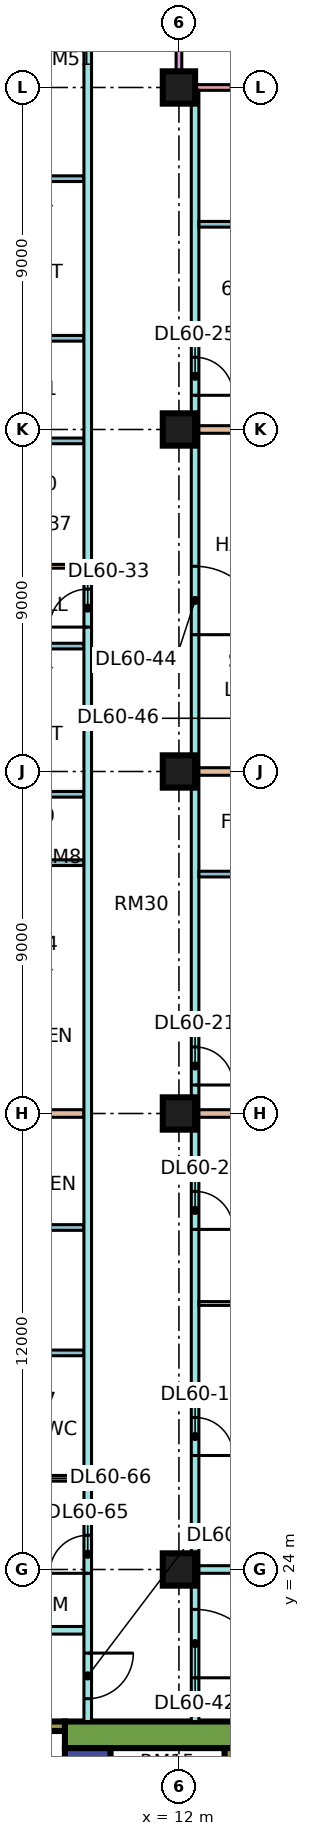
"""IFC4 building model, lengths in metres.
Left out: names, types, materials, properties, quantities, classifications, styles, units other than length and angle.
Written with IfcOpenShell. Run it as: python <this file> out.ifc"""

import sys

from ifc_helpers import new_model, si_unit, direction, frame, frame_2d, origin, origin_2d, place, context, subcontext, project, spatial, rectangle, extrude, element, fill, save


model = new_model("IFC4")
c1 = context("Model", 3, precision=1e-05, world=origin(), true_north=direction((0.0, 1.0)))
c2 = subcontext(c1, "Body", "Model", "MODEL_VIEW")
j1 = project(units=[si_unit("LENGTHUNIT", "METRE"), si_unit("PLANEANGLEUNIT", "RADIAN")], contexts=[c1])
p1 = place(None, origin())
s1 = spatial("IfcSite", under=j1, at=p1, CompositionType="ELEMENT")
p2 = place(p1, origin())
s2 = spatial("IfcBuilding", under=s1, at=p2, CompositionType="ELEMENT")
p3 = place(p2, frame((0.0, 0.0, 252.9)))
s3 = spatial("IfcBuildingStorey", under=s2, at=p3, CompositionType="ELEMENT", Elevation=252.9)
for number, where, z_axis, x_axis in (
    (1, (12.0, 24.0, 0.0), (0.0, 0.0, 1.0), (1.0, 0.0, 0.0)),
    (2, (12.0, 36.0, 0.0), (0.0, 0.0, 1.0), (1.0, 0.0, 0.0)),
    (3, (12.0, 45.0, 0.0), (0.0, 0.0, 1.0), (1.0, 0.0, 0.0)),
    (4, (12.0, 54.0, 0.0), (0.0, 0.0, 1.0), (1.0, 0.0, 0.0)),
    (5, (12.0, 63.0, 0.0), (0.0, 0.0, 1.0), (1.0, 0.0, 0.0)),
):
    element("IfcColumn", number, at=place(p3, frame(where, z_axis=z_axis, x_axis=x_axis)), inside=s3, PredefinedType="COLUMN", context=c2, shape_type="SweptSolid", body=[
        extrude(rectangle(XDim=0.85, YDim=0.85, at=origin_2d()), origin(), (0.0, 0.0, 1.0), 3.75),
    ])
p4 = place(p3, frame((9.0, 19.65, 0.0), z_axis=(0.0, 0.0, 1.0), x_axis=(1.0, 0.0, 0.0)))
e6 = element("IfcWall", 6, at=p4, inside=s3, PredefinedType="SHEAR", context=c2, shape_type="SweptSolid", body=[
    extrude(rectangle(XDim=25.0, YDim=0.7, at=frame_2d((12.5, 0.0))), origin(), (0.0, 0.0, 1.0), 3.75),
])
p5 = place(p4, frame((19.1, 0.0, 0.0)))
e7 = element("IfcOpeningElement", 7, at=p5, cuts=e6, PredefinedType="OPENING", context=c2, shape_type="SweptSolid", body=[
    extrude(rectangle(XDim=1.8, YDim=2.4, at=frame_2d((0.9, 1.2))), frame((0.0, 0.36, 0.0), z_axis=(0.0, -1.0, 0.0), x_axis=(1.0, 0.0, 0.0)), (0.0, 0.0, 1.0), 0.72),
])
p6 = place(p3, frame((9.6, 7.7, 0.0), z_axis=(0.0, 0.0, 1.0), x_axis=(0.0, 1.0, 0.0)))
e8 = element("IfcWall", 8, at=p6, inside=s3, PredefinedType="SHEAR", context=c2, shape_type="SweptSolid", body=[
    extrude(rectangle(XDim=11.6, YDim=1.2, at=frame_2d((5.8, 0.0))), origin(), (0.0, 0.0, 1.0), 3.75),
])
p7 = place(p6, frame((4.175, 0.0, 0.0)))
e9 = element("IfcOpeningElement", 9, at=p7, cuts=e8, PredefinedType="OPENING", context=c2, shape_type="SweptSolid", body=[
    extrude(rectangle(XDim=1.1, YDim=2.2, at=frame_2d((0.55, 1.1))), frame((0.0, 0.61, 0.0), z_axis=(0.0, -1.0, 0.0), x_axis=(1.0, 0.0, 0.0)), (0.0, 0.0, 1.0), 1.22),
])
p8 = place(p6, frame((6.675, 0.0, 0.0)))
e10 = element("IfcOpeningElement", 10, at=p8, cuts=e8, PredefinedType="OPENING", context=c2, shape_type="SweptSolid", body=[
    extrude(rectangle(XDim=1.1, YDim=2.2, at=frame_2d((0.55, 1.1))), frame((0.0, 0.61, 0.0), z_axis=(0.0, -1.0, 0.0), x_axis=(1.0, 0.0, 0.0)), (0.0, 0.0, 1.0), 1.22),
])
p9 = place(p6, frame((9.55, 0.0, 0.0)))
e11 = element("IfcOpeningElement", 11, at=p9, cuts=e8, PredefinedType="OPENING", context=c2, shape_type="SweptSolid", body=[
    extrude(rectangle(XDim=1.1, YDim=2.2, at=frame_2d((0.55, 1.1))), frame((0.0, 0.61, 0.0), z_axis=(0.0, -1.0, 0.0), x_axis=(1.0, 0.0, 0.0)), (0.0, 0.0, 1.0), 1.22),
])
p10 = place(p6, frame((1.85, 0.0, 0.0)))
e12 = element("IfcOpeningElement", 12, at=p10, cuts=e8, PredefinedType="OPENING", context=c2, shape_type="SweptSolid", body=[
    extrude(rectangle(XDim=0.9, YDim=2.1, at=frame_2d((0.45, 1.05))), frame((0.0, 0.61, 0.0), z_axis=(0.0, -1.0, 0.0), x_axis=(1.0, 0.0, 0.0)), (0.0, 0.0, 1.0), 1.22),
])
p11 = place(p3, frame((13.325, 7.7, 0.0), z_axis=(0.0, 0.0, 1.0), x_axis=(0.0, 1.0, 0.0)))
e13 = element("IfcWall", 13, at=p11, inside=s3, PredefinedType="SHEAR", context=c2, shape_type="SweptSolid", body=[
    extrude(rectangle(XDim=11.6, YDim=0.25, at=frame_2d((5.8, 0.0))), origin(), (0.0, 0.0, 1.0), 3.75),
])
p12 = place(p3, frame((2.1, 19.875, 0.0), z_axis=(0.0, 0.0, 1.0), x_axis=(1.0, 0.0, 0.0)))
e14 = element("IfcWall", 14, at=p12, inside=s3, PredefinedType="SHEAR", context=c2, shape_type="SweptSolid", body=[
    extrude(rectangle(XDim=6.9, YDim=0.25, at=frame_2d((3.45, 0.0))), origin(), (0.0, 0.0, 1.0), 3.75),
])
p13 = place(p12, frame((1.175, 0.0, 0.0)))
e15 = element("IfcOpeningElement", 15, at=p13, cuts=e14, PredefinedType="OPENING", context=c2, shape_type="SweptSolid", body=[
    extrude(rectangle(XDim=1.1, YDim=2.2, at=frame_2d((0.55, 1.1))), frame((0.0, 0.135, 0.0), z_axis=(0.0, -1.0, 0.0), x_axis=(1.0, 0.0, 0.0)), (0.0, 0.0, 1.0), 0.27),
])
p14 = place(p12, frame((4.6, 0.0, 0.0)))
e16 = element("IfcOpeningElement", 16, at=p14, cuts=e14, PredefinedType="OPENING", context=c2, shape_type="SweptSolid", body=[
    extrude(rectangle(XDim=1.2, YDim=2.2, at=frame_2d((0.6, 1.1))), frame((0.0, 0.135, 0.0), z_axis=(0.0, -1.0, 0.0), x_axis=(1.0, 0.0, 0.0)), (0.0, 0.0, 1.0), 0.27),
])
p15 = place(p3, frame((22.425, 63.0, 0.0), z_axis=(0.0, 0.0, 1.0), x_axis=(-1.0, 0.0, 0.0)))
e17 = element("IfcWall", 17, at=p15, inside=s3, PredefinedType="SOLIDWALL", context=c2, shape_type="SweptSolid", body=[
    extrude(rectangle(XDim=10.35, YDim=0.15, at=frame_2d((5.175, 0.0))), origin(), (0.0, 0.0, 1.0), 3.3),
])
p16 = place(p15, frame((1.7, 0.0, 0.0)))
e18 = element("IfcOpeningElement", 18, at=p16, cuts=e17, PredefinedType="OPENING", context=c2, shape_type="SweptSolid", body=[
    extrude(rectangle(XDim=1.8, YDim=2.4, at=frame_2d((0.9, 1.2))), frame((0.0, 0.085, 0.0), z_axis=(0.0, -1.0, 0.0), x_axis=(1.0, 0.0, 0.0)), (0.0, 0.0, 1.0), 0.17),
])
p17 = place(p15, frame((6.05, 0.0, 0.45)))
e19 = element("IfcOpeningElement", 19, at=p17, cuts=e17, PredefinedType="OPENING", context=c2, shape_type="SweptSolid", body=[
    extrude(rectangle(XDim=3.0, YDim=2.4, at=frame_2d((1.5, 1.2))), frame((0.0, 0.085, 0.0), z_axis=(0.0, -1.0, 0.0), x_axis=(1.0, 0.0, 0.0)), (0.0, 0.0, 1.0), 0.17),
])
p18 = place(p3, frame((12.0, 64.5, 0.0), z_axis=(0.0, 0.0, 1.0), x_axis=(0.0, -1.0, 0.0)))
e20 = element("IfcWall", 20, at=p18, inside=s3, PredefinedType="SOLIDWALL", context=c2, shape_type="SweptSolid", body=[
    extrude(rectangle(XDim=1.5, YDim=0.15, at=frame_2d((0.75, 0.0))), origin(), (0.0, 0.0, 1.0), 3.3),
])
p19 = place(p3, frame((0.074, 22.4, 0.0), z_axis=(0.0, 0.0, 1.0), x_axis=(1.0, 0.0, 0.0)))
e21 = element("IfcWall", 21, at=p19, inside=s3, PredefinedType="PARTITIONING", context=c2, shape_type="SweptSolid", body=[
    extrude(rectangle(XDim=9.426, YDim=0.2, at=frame_2d((4.713, 0.0))), origin(), (0.0, 0.0, 1.0), 3.3),
])
p20 = place(p3, frame((6.375, 26.4, 0.0), z_axis=(0.0, 0.0, 1.0), x_axis=(1.0, 0.0, 0.0)))
e22 = element("IfcWall", 22, at=p20, inside=s3, PredefinedType="PARTITIONING", context=c2, shape_type="SweptSolid", body=[
    extrude(rectangle(XDim=3.125, YDim=0.15, at=frame_2d((1.562, 0.0))), origin(), (0.0, 0.0, 1.0), 3.3),
])
p21 = place(p20, frame((1.225, 0.0, 0.0)))
e23 = element("IfcOpeningElement", 23, at=p21, cuts=e22, PredefinedType="OPENING", context=c2, shape_type="SweptSolid", body=[
    extrude(rectangle(XDim=0.8, YDim=2.1, at=frame_2d((0.4, 1.05))), frame((0.0, 0.085, 0.0), z_axis=(0.0, -1.0, 0.0), x_axis=(1.0, 0.0, 0.0)), (0.0, 0.0, 1.0), 0.17),
])
for number, where, z_axis, x_axis in (
    (24, (6.375, 29.7, 0.0), (0.0, 0.0, 1.0), (1.0, 0.0, 0.0)),
    (25, (6.375, 33.0, 0.0), (0.0, 0.0, 1.0), (1.0, 0.0, 0.0)),
):
    element("IfcWall", number, at=place(p3, frame(where, z_axis=z_axis, x_axis=x_axis)), inside=s3, PredefinedType="PARTITIONING", context=c2, shape_type="SweptSolid", body=[
        extrude(rectangle(XDim=3.125, YDim=0.15, at=frame_2d((1.562, 0.0))), origin(), (0.0, 0.0, 1.0), 3.3),
    ])
p22 = place(p3, frame((6.525, 36.0, 0.0), z_axis=(0.0, 0.0, 1.0), x_axis=(1.0, 0.0, 0.0)))
e26 = element("IfcWall", 26, at=p22, inside=s3, PredefinedType="PARTITIONING", context=c2, shape_type="SweptSolid", body=[
    extrude(rectangle(XDim=2.975, YDim=0.2, at=frame_2d((1.488, 0.0))), origin(), (0.0, 0.0, 1.0), 3.3),
])
for number, where, z_axis, x_axis in (
    (27, (6.675, 42.6, 0.0), (0.0, 0.0, 1.0), (1.0, 0.0, 0.0)),
    (28, (6.675, 44.4, 0.0), (0.0, 0.0, 1.0), (1.0, 0.0, 0.0)),
    (29, (6.675, 48.3, 0.0), (0.0, 0.0, 1.0), (1.0, 0.0, 0.0)),
):
    element("IfcWall", number, at=place(p3, frame(where, z_axis=z_axis, x_axis=x_axis)), inside=s3, PredefinedType="PARTITIONING", context=c2, shape_type="SweptSolid", body=[
        extrude(rectangle(XDim=2.825, YDim=0.15, at=frame_2d((1.413, 0.0))), origin(), (0.0, 0.0, 1.0), 3.3),
    ])
p23 = place(p3, frame((6.675, 50.4, 0.0), z_axis=(0.0, 0.0, 1.0), x_axis=(1.0, 0.0, 0.0)))
e30 = element("IfcWall", 30, at=p23, inside=s3, PredefinedType="PARTITIONING", context=c2, shape_type="SweptSolid", body=[
    extrude(rectangle(XDim=2.825, YDim=0.1, at=frame_2d((1.413, 0.0))), origin(), (0.0, 0.0, 1.0), 3.3),
])
p24 = place(p23, frame((0.975, 0.0, 0.0)))
e31 = element("IfcOpeningElement", 31, at=p24, cuts=e30, PredefinedType="OPENING", context=c2, shape_type="SweptSolid", body=[
    extrude(rectangle(XDim=0.9, YDim=2.1, at=frame_2d((0.45, 1.05))), frame((0.0, 0.06, 0.0), z_axis=(0.0, -1.0, 0.0), x_axis=(1.0, 0.0, 0.0)), (0.0, 0.0, 1.0), 0.12),
])
for number, where, z_axis, x_axis in (
    (32, (6.675, 53.7, 0.0), (0.0, 0.0, 1.0), (1.0, 0.0, 0.0)),
    (33, (6.675, 56.4, 0.0), (0.0, 0.0, 1.0), (1.0, 0.0, 0.0)),
    (34, (6.675, 60.6, 0.0), (0.0, 0.0, 1.0), (1.0, 0.0, 0.0)),
):
    element("IfcWall", number, at=place(p3, frame(where, z_axis=z_axis, x_axis=x_axis)), inside=s3, PredefinedType="PARTITIONING", context=c2, shape_type="SweptSolid", body=[
        extrude(rectangle(XDim=2.825, YDim=0.15, at=frame_2d((1.413, 0.0))), origin(), (0.0, 0.0, 1.0), 3.3),
    ])
p25 = place(p3, frame((9.6, 20.0, 0.0), z_axis=(0.0, 0.0, 1.0), x_axis=(0.0, 1.0, 0.0)))
e35 = element("IfcWall", 35, at=p25, inside=s3, PredefinedType="PARTITIONING", context=c2, shape_type="SweptSolid", body=[
    extrude(rectangle(XDim=44.35, YDim=0.2, at=frame_2d((22.175, 0.0))), origin(), (0.0, 0.0, 1.0), 3.3),
])
p26 = place(p25, frame((28.8, 0.0, 0.0)))
e36 = element("IfcOpeningElement", 36, at=p26, cuts=e35, PredefinedType="OPENING", context=c2, shape_type="SweptSolid", body=[
    extrude(rectangle(XDim=1.0, YDim=2.1, at=frame_2d((0.5, 1.05))), frame((0.0, 0.11, 0.0), z_axis=(0.0, -1.0, 0.0), x_axis=(1.0, 0.0, 0.0)), (0.0, 0.0, 1.0), 0.22),
])
p27 = place(p25, frame((0.6, 0.0, 0.0)))
e37 = element("IfcOpeningElement", 37, at=p27, cuts=e35, PredefinedType="OPENING", context=c2, shape_type="SweptSolid", body=[
    extrude(rectangle(XDim=1.2, YDim=2.1, at=frame_2d((0.6, 1.05))), frame((0.0, 0.11, 0.0), z_axis=(0.0, -1.0, 0.0), x_axis=(1.0, 0.0, 0.0)), (0.0, 0.0, 1.0), 0.22),
])
p28 = place(p25, frame((3.9, 0.0, 0.0)))
e38 = element("IfcOpeningElement", 38, at=p28, cuts=e35, PredefinedType="OPENING", context=c2, shape_type="SweptSolid", body=[
    extrude(rectangle(XDim=1.0, YDim=2.1, at=frame_2d((0.5, 1.05))), frame((0.0, 0.11, 0.0), z_axis=(0.0, -1.0, 0.0), x_axis=(1.0, 0.0, 0.0)), (0.0, 0.0, 1.0), 0.22),
])
p29 = place(p3, frame((12.425, 20.0, 0.0), z_axis=(0.0, 0.0, 1.0), x_axis=(0.0, 1.0, 0.0)))
e39 = element("IfcWall", 39, at=p29, inside=s3, PredefinedType="PARTITIONING", context=c2, shape_type="SweptSolid", body=[
    extrude(rectangle(XDim=42.926, YDim=0.2, at=frame_2d((21.463, 0.0))), origin(), (0.0, 0.0, 1.0), 3.3),
])
p30 = place(p29, frame((7.0, 0.0, 0.0)))
e40 = element("IfcOpeningElement", 40, at=p30, cuts=e39, PredefinedType="OPENING", context=c2, shape_type="SweptSolid", body=[
    extrude(rectangle(XDim=1.0, YDim=2.1, at=frame_2d((0.5, 1.05))), frame((0.0, 0.11, 0.0), z_axis=(0.0, -1.0, 0.0), x_axis=(1.0, 0.0, 0.0)), (0.0, 0.0, 1.0), 0.22),
])
p31 = place(p29, frame((12.95, 0.0, 0.0)))
e41 = element("IfcOpeningElement", 41, at=p31, cuts=e39, PredefinedType="OPENING", context=c2, shape_type="SweptSolid", body=[
    extrude(rectangle(XDim=1.0, YDim=2.1, at=frame_2d((0.5, 1.05))), frame((0.0, 0.11, 0.0), z_axis=(0.0, -1.0, 0.0), x_axis=(1.0, 0.0, 0.0)), (0.0, 0.0, 1.0), 0.22),
])
p32 = place(p29, frame((16.75, 0.0, 0.0)))
e42 = element("IfcOpeningElement", 42, at=p32, cuts=e39, PredefinedType="OPENING", context=c2, shape_type="SweptSolid", body=[
    extrude(rectangle(XDim=1.0, YDim=2.1, at=frame_2d((0.5, 1.05))), frame((0.0, 0.11, 0.0), z_axis=(0.0, -1.0, 0.0), x_axis=(1.0, 0.0, 0.0)), (0.0, 0.0, 1.0), 0.22),
])
p33 = place(p29, frame((34.9, 0.0, 0.0)))
e43 = element("IfcOpeningElement", 43, at=p33, cuts=e39, PredefinedType="OPENING", context=c2, shape_type="SweptSolid", body=[
    extrude(rectangle(XDim=1.0, YDim=2.1, at=frame_2d((0.5, 1.05))), frame((0.0, 0.11, 0.0), z_axis=(0.0, -1.0, 0.0), x_axis=(1.0, 0.0, 0.0)), (0.0, 0.0, 1.0), 0.22),
])
p34 = place(p29, frame((1.15, 0.0, 0.0)))
e44 = element("IfcOpeningElement", 44, at=p34, cuts=e39, PredefinedType="OPENING", context=c2, shape_type="SweptSolid", body=[
    extrude(rectangle(XDim=1.8, YDim=2.1, at=frame_2d((0.9, 1.05))), frame((0.0, 0.11, 0.0), z_axis=(0.0, -1.0, 0.0), x_axis=(1.0, 0.0, 0.0)), (0.0, 0.0, 1.0), 0.22),
])
p35 = place(p29, frame((28.6, 0.0, 0.0)))
e45 = element("IfcOpeningElement", 45, at=p35, cuts=e39, PredefinedType="OPENING", context=c2, shape_type="SweptSolid", body=[
    extrude(rectangle(XDim=1.8, YDim=2.1, at=frame_2d((0.9, 1.05))), frame((0.0, 0.11, 0.0), z_axis=(0.0, -1.0, 0.0), x_axis=(1.0, 0.0, 0.0)), (0.0, 0.0, 1.0), 0.22),
])
p36 = place(p3, frame((12.525, 24.0, 0.0), z_axis=(0.0, 0.0, 1.0), x_axis=(1.0, 0.0, 0.0)))
e46 = element("IfcWall", 46, at=p36, inside=s3, PredefinedType="PARTITIONING", context=c2, shape_type="SweptSolid", body=[
    extrude(rectangle(XDim=8.975, YDim=0.2, at=frame_2d((4.488, 0.0))), origin(), (0.0, 0.0, 1.0), 3.3),
])
p37 = place(p3, frame((12.525, 31.0, 0.0), z_axis=(0.0, 0.0, 1.0), x_axis=(1.0, 0.0, 0.0)))
e47 = element("IfcWall", 47, at=p37, inside=s3, PredefinedType="PARTITIONING", context=c2, shape_type="SweptSolid", body=[
    extrude(rectangle(XDim=8.975, YDim=0.1, at=frame_2d((4.488, 0.0))), origin(), (0.0, 0.0, 1.0), 3.3),
])
p38 = place(p3, frame((12.525, 36.0, 0.0), z_axis=(0.0, 0.0, 1.0), x_axis=(1.0, 0.0, 0.0)))
e48 = element("IfcWall", 48, at=p38, inside=s3, PredefinedType="PARTITIONING", context=c2, shape_type="SweptSolid", body=[
    extrude(rectangle(XDim=11.475, YDim=0.2, at=frame_2d((5.738, 0.0))), origin(), (0.0, 0.0, 1.0), 3.3),
])
for number, where, z_axis, x_axis in (
    (49, (12.525, 38.4, 0.0), (0.0, 0.0, 1.0), (1.0, 0.0, 0.0)),
    (50, (12.525, 42.3, 0.0), (0.0, 0.0, 1.0), (1.0, 0.0, 0.0)),
):
    element("IfcWall", number, at=place(p3, frame(where, z_axis=z_axis, x_axis=x_axis)), inside=s3, PredefinedType="PARTITIONING", context=c2, shape_type="SweptSolid", body=[
        extrude(rectangle(XDim=5.225, YDim=0.15, at=frame_2d((2.613, 0.0))), origin(), (0.0, 0.0, 1.0), 3.3),
    ])
p39 = place(p3, frame((12.525, 45.0, 0.0), z_axis=(0.0, 0.0, 1.0), x_axis=(1.0, 0.0, 0.0)))
e51 = element("IfcWall", 51, at=p39, inside=s3, PredefinedType="PARTITIONING", context=c2, shape_type="SweptSolid", body=[
    extrude(rectangle(XDim=11.401, YDim=0.2, at=frame_2d((5.701, 0.0))), origin(), (0.0, 0.0, 1.0), 3.3),
])
p40 = place(p3, frame((12.525, 54.0, 0.0), z_axis=(0.0, 0.0, 1.0), x_axis=(1.0, 0.0, 0.0)))
e52 = element("IfcWall", 52, at=p40, inside=s3, PredefinedType="PARTITIONING", context=c2, shape_type="SweptSolid", body=[
    extrude(rectangle(XDim=11.475, YDim=0.2, at=frame_2d((5.738, 0.0))), origin(), (0.0, 0.0, 1.0), 3.3),
])
for number, where, z_axis, x_axis in (
    (53, (12.525, 56.7, 0.0), (0.0, 0.0, 1.0), (1.0, 0.0, 0.0)),
    (54, (12.525, 59.4, 0.0), (0.0, 0.0, 1.0), (1.0, 0.0, 0.0)),
):
    element("IfcWall", number, at=place(p3, frame(where, z_axis=z_axis, x_axis=x_axis)), inside=s3, PredefinedType="PARTITIONING", context=c2, shape_type="SweptSolid", body=[
        extrude(rectangle(XDim=4.625, YDim=0.15, at=frame_2d((2.312, 0.0))), origin(), (0.0, 0.0, 1.0), 3.3),
    ])
p41 = place(p30, frame((1.0, 0.0, 0.0), z_axis=(0.0, 0.0, 1.0), x_axis=(-1.0, 0.0, 0.0)))
e55 = element("IfcDoor", 55, at=p41, inside=s3, OperationType="SINGLE_SWING_LEFT", PredefinedType="DOOR", context=c2, shape_type="SweptSolid", body=[
    extrude(rectangle(XDim=1.0, YDim=2.1, at=frame_2d((0.5, 1.05))), frame((0.0, 0.025, 0.0), z_axis=(0.0, -1.0, 0.0), x_axis=(1.0, 0.0, 0.0)), (0.0, 0.0, 1.0), 0.05),
])
fill(e40, e55)
p42 = place(p31, frame((1.0, 0.0, 0.0), z_axis=(0.0, 0.0, 1.0), x_axis=(-1.0, 0.0, 0.0)))
e56 = element("IfcDoor", 56, at=p42, inside=s3, OperationType="SINGLE_SWING_LEFT", PredefinedType="DOOR", context=c2, shape_type="SweptSolid", body=[
    extrude(rectangle(XDim=1.0, YDim=2.1, at=frame_2d((0.5, 1.05))), frame((0.0, 0.025, 0.0), z_axis=(0.0, -1.0, 0.0), x_axis=(1.0, 0.0, 0.0)), (0.0, 0.0, 1.0), 0.05),
])
fill(e41, e56)
p43 = place(p32, frame((1.0, 0.0, 0.0), z_axis=(0.0, 0.0, 1.0), x_axis=(-1.0, 0.0, 0.0)))
e57 = element("IfcDoor", 57, at=p43, inside=s3, OperationType="SINGLE_SWING_LEFT", PredefinedType="DOOR", context=c2, shape_type="SweptSolid", body=[
    extrude(rectangle(XDim=1.0, YDim=2.1, at=frame_2d((0.5, 1.05))), frame((0.0, 0.025, 0.0), z_axis=(0.0, -1.0, 0.0), x_axis=(1.0, 0.0, 0.0)), (0.0, 0.0, 1.0), 0.05),
])
fill(e42, e57)
p44 = place(p33, frame((1.0, 0.0, 0.0), z_axis=(0.0, 0.0, 1.0), x_axis=(-1.0, 0.0, 0.0)))
e58 = element("IfcDoor", 58, at=p44, inside=s3, OperationType="SINGLE_SWING_LEFT", PredefinedType="DOOR", context=c2, shape_type="SweptSolid", body=[
    extrude(rectangle(XDim=1.0, YDim=2.1, at=frame_2d((0.5, 1.05))), frame((0.0, 0.025, 0.0), z_axis=(0.0, -1.0, 0.0), x_axis=(1.0, 0.0, 0.0)), (0.0, 0.0, 1.0), 0.05),
])
fill(e43, e58)
p45 = place(p26, origin())
e59 = element("IfcDoor", 59, at=p45, inside=s3, OperationType="SINGLE_SWING_LEFT", PredefinedType="DOOR", context=c2, shape_type="SweptSolid", body=[
    extrude(rectangle(XDim=1.0, YDim=2.1, at=frame_2d((0.5, 1.05))), frame((0.0, 0.025, 0.0), z_axis=(0.0, -1.0, 0.0), x_axis=(1.0, 0.0, 0.0)), (0.0, 0.0, 1.0), 0.05),
])
fill(e36, e59)
p46 = place(p34, frame((1.8, 0.0, 0.0), z_axis=(0.0, 0.0, 1.0), x_axis=(-1.0, 0.0, 0.0)))
e60 = element("IfcDoor", 60, at=p46, inside=s3, OperationType="DOUBLE_DOOR_SINGLE_SWING", PredefinedType="DOOR", context=c2, shape_type="SweptSolid", body=[
    extrude(rectangle(XDim=1.8, YDim=2.1, at=frame_2d((0.9, 1.05))), frame((0.0, 0.025, 0.0), z_axis=(0.0, -1.0, 0.0), x_axis=(1.0, 0.0, 0.0)), (0.0, 0.0, 1.0), 0.05),
])
fill(e44, e60)
p47 = place(p27, origin())
e61 = element("IfcDoor", 61, at=p47, inside=s3, OperationType="SINGLE_SWING_RIGHT", PredefinedType="DOOR", context=c2, shape_type="SweptSolid", body=[
    extrude(rectangle(XDim=1.2, YDim=2.1, at=frame_2d((0.6, 1.05))), frame((0.0, 0.025, 0.0), z_axis=(0.0, -1.0, 0.0), x_axis=(1.0, 0.0, 0.0)), (0.0, 0.0, 1.0), 0.05),
])
fill(e37, e61)
p48 = place(p35, frame((1.8, 0.0, 0.0), z_axis=(0.0, 0.0, 1.0), x_axis=(-1.0, 0.0, 0.0)))
e62 = element("IfcDoor", 62, at=p48, inside=s3, OperationType="DOUBLE_DOOR_SINGLE_SWING", PredefinedType="DOOR", context=c2, shape_type="SweptSolid", body=[
    extrude(rectangle(XDim=1.8, YDim=2.1, at=frame_2d((0.9, 1.05))), frame((0.0, 0.025, 0.0), z_axis=(0.0, -1.0, 0.0), x_axis=(1.0, 0.0, 0.0)), (0.0, 0.0, 1.0), 0.05),
])
fill(e45, e62)
p49 = place(p28, origin())
e63 = element("IfcDoor", 63, at=p49, inside=s3, OperationType="SINGLE_SWING_LEFT", PredefinedType="DOOR", context=c2, shape_type="SweptSolid", body=[
    extrude(rectangle(XDim=1.0, YDim=2.1, at=frame_2d((0.5, 1.05))), frame((0.0, 0.025, 0.0), z_axis=(0.0, -1.0, 0.0), x_axis=(1.0, 0.0, 0.0)), (0.0, 0.0, 1.0), 0.05),
])
fill(e38, e63)
save(model, sys.argv[1])
